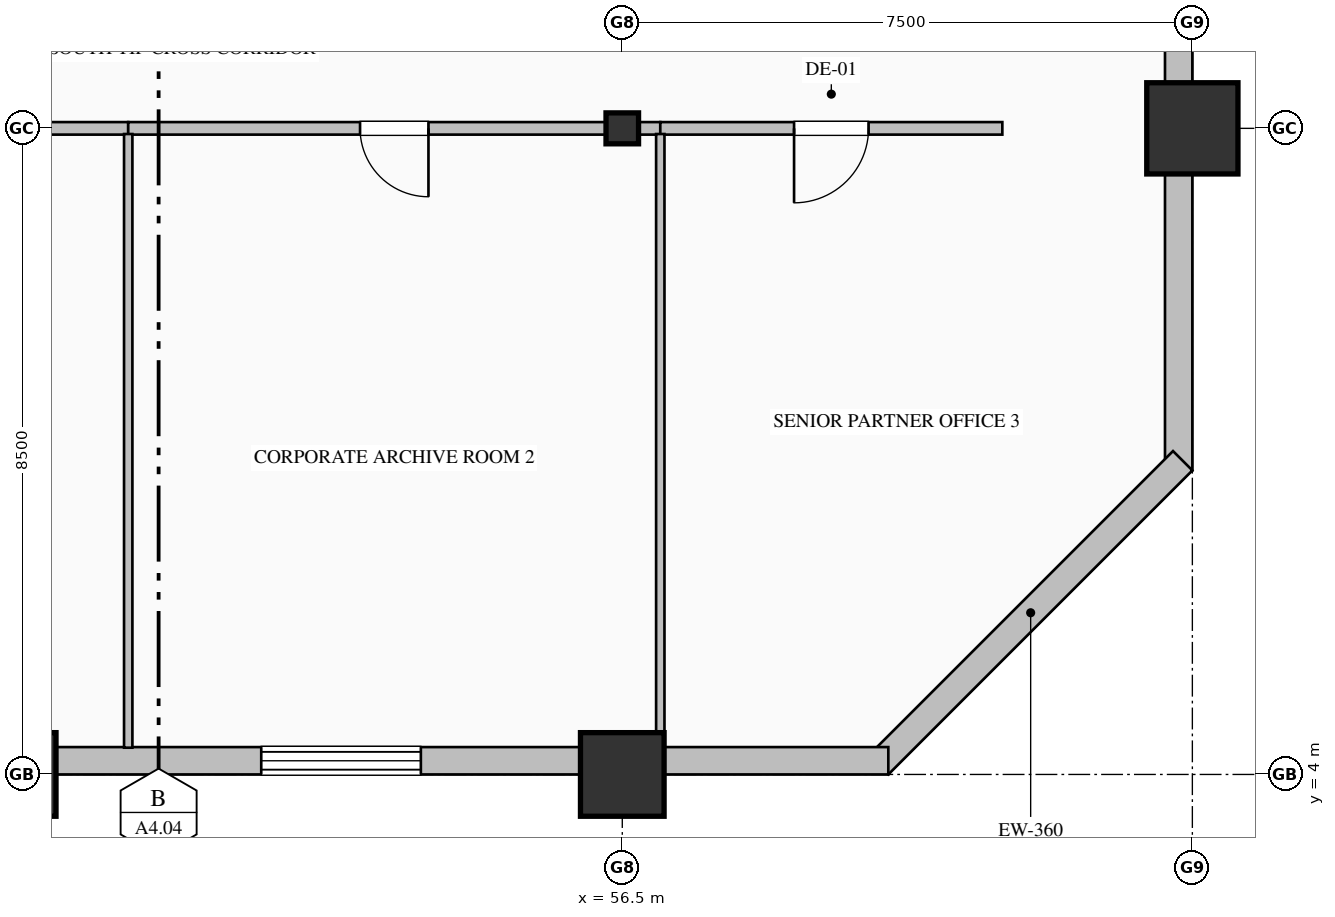
"""IFC4 building model, lengths in metres.
Left out: names, types, materials, properties, quantities, classifications, styles, units other than length and angle.
Written with IfcOpenShell. Run it as: python <this file> out.ifc"""

import sys

from ifc_helpers import new_model, si_unit, direction, frame, frame_2d, origin, origin_2d, place, context, subcontext, project, spatial, rectangle, hollow_rectangle, hollow_circle, i_section, extrude, element, fill, save


model = new_model("IFC4")
c1 = context("Model", 3, precision=1e-05, world=origin(), true_north=direction((0.0, 1.0)))
c2 = subcontext(c1, "Body", "Model", "MODEL_VIEW")
j1 = project(units=[si_unit("LENGTHUNIT", "METRE"), si_unit("PLANEANGLEUNIT", "RADIAN")], contexts=[c1])
p1 = place(None, origin())
s1 = spatial("IfcSite", under=j1, at=p1, CompositionType="ELEMENT")
p2 = place(p1, origin())
s2 = spatial("IfcBuilding", under=s1, at=p2, CompositionType="ELEMENT")
p3 = place(p2, frame((0.0, 0.0, 104.2)))
s3 = spatial("IfcBuildingStorey", under=s2, at=p3, CompositionType="ELEMENT", Elevation=104.2)
for number, where, z_axis, x_axis in (
    (1, (48.5, 4.0, 0.0), (0.0, 0.0, 1.0), (1.0, 0.0, 0.0)),
    (2, (56.5, 4.0, 0.0), (0.0, 0.0, 1.0), (1.0, 0.0, 0.0)),
):
    element("IfcColumn", number, at=place(p3, frame(where, z_axis=z_axis, x_axis=x_axis)), inside=s3, PredefinedType="COLUMN", context=c2, shape_type="SweptSolid", body=[
        extrude(hollow_rectangle(XDim=1.1, YDim=1.1, WallThickness=0.04, at=origin_2d()), origin(), (0.0, 0.0, 1.0), 4.0),
    ])
p4 = place(p3, frame((56.5, 12.5, 0.0), z_axis=(0.0, 0.0, 1.0), x_axis=(1.0, 0.0, 0.0)))
e3 = element("IfcColumn", 3, at=p4, inside=s3, PredefinedType="COLUMN", context=c2, shape_type="SweptSolid", body=[
    extrude(i_section(OverallWidth=0.407, OverallDepth=0.428, WebThickness=0.02, FlangeThickness=0.035, FilletRadius=0.022, at=origin_2d()), origin(), (0.0, 0.0, 1.0), 4.0),
])
p5 = place(p3, frame((64.0, 12.5, 0.0), z_axis=(0.0, 0.0, 1.0), x_axis=(1.0, 0.0, 0.0)))
e4 = element("IfcColumn", 4, at=p5, inside=s3, PredefinedType="COLUMN", context=c2, shape_type="SweptSolid", body=[
    extrude(hollow_circle(Radius=0.6, WallThickness=0.04, at=origin_2d()), origin(), (0.0, 0.0, 1.0), 4.0),
])
p6 = place(p3, frame((63.82, 36.05, 0.0), z_axis=(0.0, 0.0, 1.0), x_axis=(0.0, -1.0, 0.0)))
e5 = element("IfcWall", 5, at=p6, inside=s3, PredefinedType="SOLIDWALL", context=c2, shape_type="SweptSolid", body=[
    extrude(rectangle(XDim=28.05, YDim=0.36, at=frame_2d((14.025, 0.0))), origin(), (0.0, 0.0, 1.0), 3.15),
])
p7 = place(p6, frame((2.55, 0.0, 0.85)))
e6 = element("IfcOpeningElement", 6, at=p7, cuts=e5, PredefinedType="OPENING", context=c2, shape_type="SweptSolid", body=[
    extrude(rectangle(XDim=2.1, YDim=2.05, at=frame_2d((1.05, 1.025))), frame((0.0, 0.19, 0.0), z_axis=(0.0, -1.0, 0.0), x_axis=(1.0, 0.0, 0.0)), (0.0, 0.0, 1.0), 0.38),
])
p8 = place(p6, frame((9.9, 0.0, 0.85)))
e7 = element("IfcOpeningElement", 7, at=p8, cuts=e5, PredefinedType="OPENING", context=c2, shape_type="SweptSolid", body=[
    extrude(rectangle(XDim=1.8, YDim=2.05, at=frame_2d((0.9, 1.025))), frame((0.0, 0.19, 0.0), z_axis=(0.0, -1.0, 0.0), x_axis=(1.0, 0.0, 0.0)), (0.0, 0.0, 1.0), 0.38),
])
p9 = place(p3, frame((63.873, 8.127, 0.0), z_axis=(0.0, 0.0, 1.0), x_axis=(-0.707106781187, -0.707106781187, 0.0)))
e8 = element("IfcWall", 8, at=p9, inside=s3, PredefinedType="SOLIDWALL", context=c2, shape_type="SweptSolid", body=[
    extrude(rectangle(XDim=5.657, YDim=0.36, at=frame_2d((2.828, 0.0))), origin(), (0.0, 0.0, 1.0), 3.65),
])
p10 = place(p3, frame((60.0, 4.18, 0.0), z_axis=(0.0, 0.0, 1.0), x_axis=(-1.0, 0.0, 0.0)))
e9 = element("IfcWall", 9, at=p10, inside=s3, PredefinedType="SOLIDWALL", context=c2, shape_type="SweptSolid", body=[
    extrude(rectangle(XDim=15.5, YDim=0.36, at=frame_2d((7.75, 0.0))), origin(), (0.0, 0.0, 1.0), 3.15),
])
p11 = place(p10, frame((6.15, 0.0, 0.85)))
e10 = element("IfcOpeningElement", 10, at=p11, cuts=e9, PredefinedType="OPENING", context=c2, shape_type="SweptSolid", body=[
    extrude(rectangle(XDim=2.1, YDim=2.05, at=frame_2d((1.05, 1.025))), frame((0.0, 0.19, 0.0), z_axis=(0.0, -1.0, 0.0), x_axis=(1.0, 0.0, 0.0)), (0.0, 0.0, 1.0), 0.38),
])
p12 = place(p3, frame((50.0, 12.5, 0.0), z_axis=(0.0, 0.0, 1.0), x_axis=(-1.0, 0.0, 0.0)))
e11 = element("IfcWall", 11, at=p12, inside=s3, PredefinedType="PARTITIONING", context=c2, shape_type="SweptSolid", body=[
    extrude(rectangle(XDim=4.8, YDim=0.165, at=frame_2d((2.4, 0.0))), origin(), (0.0, 0.0, 1.0), 2.942),
])
p13 = place(p12, frame((1.85, 0.0, 0.0)))
e12 = element("IfcOpeningElement", 12, at=p13, cuts=e11, PredefinedType="OPENING", context=c2, shape_type="SweptSolid", body=[
    extrude(rectangle(XDim=1.1, YDim=2.2, at=frame_2d((0.55, 1.1))), frame((0.0, 0.093, 0.0), z_axis=(0.0, -1.0, 0.0), x_axis=(1.0, 0.0, 0.0)), (0.0, 0.0, 1.0), 0.185),
])
p14 = place(p3, frame((57.0, 12.5, 0.0), z_axis=(0.0, 0.0, 1.0), x_axis=(-1.0, 0.0, 0.0)))
e13 = element("IfcWall", 13, at=p14, inside=s3, PredefinedType="PARTITIONING", context=c2, shape_type="SweptSolid", body=[
    extrude(rectangle(XDim=7.0, YDim=0.165, at=frame_2d((3.5, 0.0))), origin(), (0.0, 0.0, 1.0), 2.942),
])
p15 = place(p14, frame((3.05, 0.0, 0.0)))
e14 = element("IfcOpeningElement", 14, at=p15, cuts=e13, PredefinedType="OPENING", context=c2, shape_type="SweptSolid", body=[
    extrude(rectangle(XDim=0.9, YDim=2.15, at=frame_2d((0.45, 1.075))), frame((0.0, 0.093, 0.0), z_axis=(0.0, -1.0, 0.0), x_axis=(1.0, 0.0, 0.0)), (0.0, 0.0, 1.0), 0.185),
])
p16 = place(p3, frame((61.5, 12.5, 0.0), z_axis=(0.0, 0.0, 1.0), x_axis=(-1.0, 0.0, 0.0)))
e15 = element("IfcWall", 15, at=p16, inside=s3, PredefinedType="PARTITIONING", context=c2, shape_type="SweptSolid", body=[
    extrude(rectangle(XDim=4.5, YDim=0.165, at=frame_2d((2.25, 0.0))), origin(), (0.0, 0.0, 1.0), 2.942),
])
p17 = place(p16, frame((1.76, 0.0, 0.0)))
e16 = element("IfcOpeningElement", 16, at=p17, cuts=e15, PredefinedType="OPENING", context=c2, shape_type="SweptSolid", body=[
    extrude(rectangle(XDim=0.98, YDim=2.25, at=frame_2d((0.49, 1.125))), frame((0.0, 0.093, 0.0), z_axis=(0.0, -1.0, 0.0), x_axis=(1.0, 0.0, 0.0)), (0.0, 0.0, 1.0), 0.185),
])
for number, where, z_axis, x_axis in (
    (17, (50.0, 12.426, 0.0), (0.0, 0.0, 1.0), (0.0, -1.0, 0.0)),
    (18, (57.0, 12.426, 0.0), (0.0, 0.0, 1.0), (0.0, -1.0, 0.0)),
):
    element("IfcWall", number, at=place(p3, frame(where, z_axis=z_axis, x_axis=x_axis)), inside=s3, PredefinedType="MOVABLE", context=c2, shape_type="SweptSolid", body=[
        extrude(rectangle(XDim=8.073, YDim=0.11, at=frame_2d((4.037, 0.0))), origin(), (0.0, 0.0, 1.0), 3.65),
    ])
p18 = place(p11, origin())
e19 = element("IfcWindow", 19, at=p18, inside=s3, PartitioningType="TRIPLE_PANEL_VERTICAL", PredefinedType="WINDOW", context=c2, shape_type="SweptSolid", body=[
    extrude(rectangle(XDim=2.1, YDim=2.05, at=frame_2d((1.05, 1.025))), frame((0.0, 0.15, 0.0), z_axis=(0.0, -1.0, 0.0), x_axis=(1.0, 0.0, 0.0)), (0.0, 0.0, 1.0), 0.06),
])
fill(e10, e19)
p19 = place(p15, origin())
e20 = element("IfcDoor", 20, at=p19, inside=s3, OperationType="SINGLE_SWING_LEFT", PredefinedType="DOOR", context=c2, shape_type="SweptSolid", body=[
    extrude(rectangle(XDim=0.9, YDim=2.15, at=frame_2d((0.45, 1.075))), frame((0.0, 0.025, 0.0), z_axis=(0.0, -1.0, 0.0), x_axis=(1.0, 0.0, 0.0)), (0.0, 0.0, 1.0), 0.05),
])
fill(e14, e20)
p20 = place(p17, origin())
e21 = element("IfcDoor", 21, at=p20, inside=s3, OperationType="SINGLE_SWING_RIGHT", PredefinedType="DOOR", context=c2, shape_type="SweptSolid", body=[
    extrude(rectangle(XDim=0.98, YDim=2.25, at=frame_2d((0.49, 1.125))), frame((0.0, 0.025, 0.0), z_axis=(0.0, -1.0, 0.0), x_axis=(1.0, 0.0, 0.0)), (0.0, 0.0, 1.0), 0.05),
])
fill(e16, e21)
save(model, sys.argv[1])
